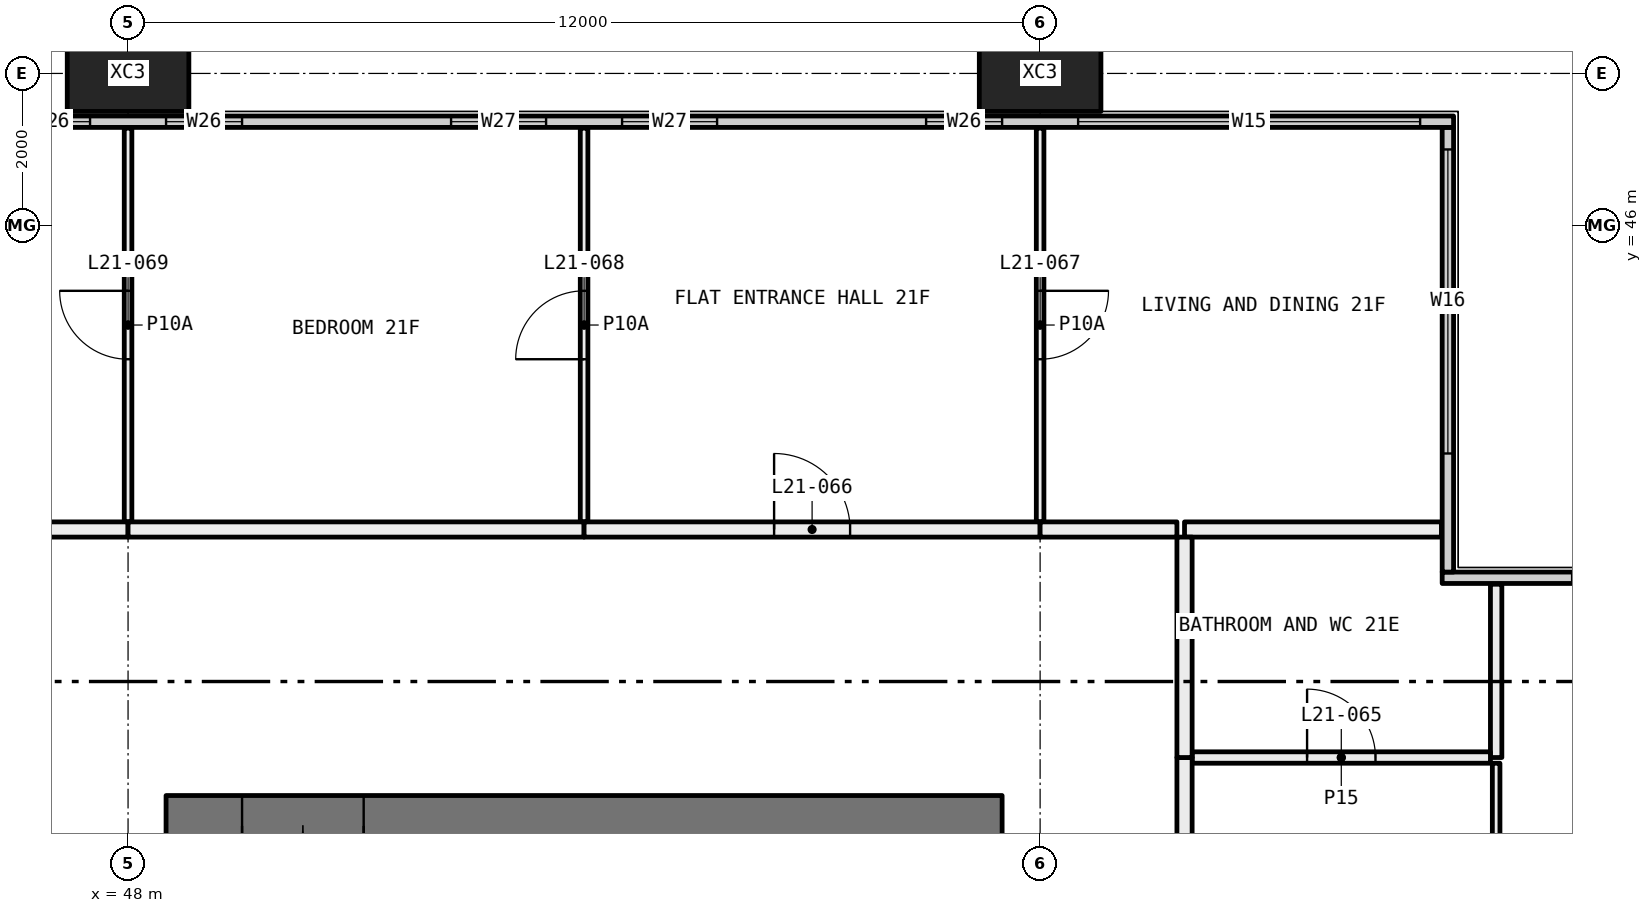
"""IFC4 building model, lengths in metres.
Left out: names, types, materials, properties, quantities, classifications, styles, units other than length and angle.
Written with IfcOpenShell. Run it as: python <this file> out.ifc"""

import sys

from ifc_helpers import new_model, si_unit, direction, frame, frame_2d, origin, origin_2d, place, context, subcontext, project, spatial, rectangle, hollow_rectangle, extrude, element, fill, save


model = new_model("IFC4")
c1 = context("Model", 3, precision=1e-05, world=origin(), true_north=direction((0.0, 1.0)))
c2 = subcontext(c1, "Body", "Model", "MODEL_VIEW")
j1 = project(units=[si_unit("LENGTHUNIT", "METRE"), si_unit("PLANEANGLEUNIT", "RADIAN")], contexts=[c1])
p1 = place(None, origin())
s1 = spatial("IfcSite", under=j1, at=p1, CompositionType="ELEMENT")
p2 = place(p1, origin())
s2 = spatial("IfcBuilding", under=s1, at=p2, CompositionType="ELEMENT")
p3 = place(p2, frame((0.0, 0.0, 85.2)))
s3 = spatial("IfcBuildingStorey", under=s2, at=p3, CompositionType="ELEMENT", Elevation=85.2)
for number, where, z_axis, x_axis in (
    (1, (48.0, 48.0, -0.4), (0.0, 0.0, 1.0), (1.0, 0.0, 0.0)),
    (2, (60.0, 48.0, -0.4), (0.0, 0.0, 1.0), (1.0, 0.0, 0.0)),
):
    element("IfcColumn", number, at=place(p3, frame(where, z_axis=z_axis, x_axis=x_axis)), inside=s3, PredefinedType="COLUMN", context=c2, shape_type="SweptSolid", body=[
        extrude(hollow_rectangle(XDim=1.6, YDim=1.0, WallThickness=0.065, at=origin_2d()), origin(), (0.0, 0.0, 1.0), 3.45),
    ])
p4 = place(p3, frame((65.29, 41.365, 0.0), z_axis=(0.0, 0.0, 1.0), x_axis=(1.0, 0.0, 0.0)))
e3 = element("IfcWall", 3, at=p4, inside=s3, PredefinedType="ELEMENTEDWALL", context=c2, shape_type="SweptSolid", body=[
    extrude(rectangle(XDim=6.15, YDim=0.15, at=frame_2d((3.075, 0.0))), origin(), (0.0, 0.0, 1.0), 3.05),
])
p5 = place(p4, frame((1.71, 0.0, 0.45)))
e4 = element("IfcOpeningElement", 4, at=p5, cuts=e3, PredefinedType="OPENING", context=c2, shape_type="SweptSolid", body=[
    extrude(rectangle(XDim=4.0, YDim=2.55, at=frame_2d((2.0, 1.275))), frame((0.0, 0.085, 0.0), z_axis=(0.0, -1.0, 0.0), x_axis=(1.0, 0.0, 0.0)), (0.0, 0.0, 1.0), 0.17),
])
p6 = place(p3, frame((65.365, 41.44, 0.0), z_axis=(0.0, 0.0, 1.0), x_axis=(0.0, 1.0, 0.0)))
e5 = element("IfcWall", 5, at=p6, inside=s3, PredefinedType="ELEMENTEDWALL", context=c2, shape_type="SweptSolid", body=[
    extrude(rectangle(XDim=5.85, YDim=0.15, at=frame_2d((2.925, 0.0))), origin(), (0.0, 0.0, 1.0), 3.05),
])
p7 = place(p6, frame((1.56, 0.0, 0.45)))
e6 = element("IfcOpeningElement", 6, at=p7, cuts=e5, PredefinedType="OPENING", context=c2, shape_type="SweptSolid", body=[
    extrude(rectangle(XDim=4.0, YDim=2.55, at=frame_2d((2.0, 1.275))), frame((0.0, 0.085, 0.0), z_axis=(0.0, -1.0, 0.0), x_axis=(1.0, 0.0, 0.0)), (0.0, 0.0, 1.0), 0.17),
])
p8 = place(p3, frame((6.56, 47.365, 0.0), z_axis=(0.0, 0.0, 1.0), x_axis=(1.0, 0.0, 0.0)))
e7 = element("IfcWall", 7, at=p8, inside=s3, PredefinedType="ELEMENTEDWALL", context=c2, shape_type="SweptSolid", body=[
    extrude(rectangle(XDim=58.88, YDim=0.15, at=frame_2d((29.44, 0.0))), origin(), (0.0, 0.0, 1.0), 3.05),
])
p9 = place(p8, frame((0.44, 0.0, 0.45)))
e8 = element("IfcOpeningElement", 8, at=p9, cuts=e7, PredefinedType="OPENING", context=c2, shape_type="SweptSolid", body=[
    extrude(rectangle(XDim=4.5, YDim=2.55, at=frame_2d((2.25, 1.275))), frame((0.0, 0.085, 0.0), z_axis=(0.0, -1.0, 0.0), x_axis=(1.0, 0.0, 0.0)), (0.0, 0.0, 1.0), 0.17),
])
p10 = place(p8, frame((5.94, 0.0, 0.45)))
e9 = element("IfcOpeningElement", 9, at=p10, cuts=e7, PredefinedType="OPENING", context=c2, shape_type="SweptSolid", body=[
    extrude(rectangle(XDim=1.0, YDim=2.55, at=frame_2d((0.5, 1.275))), frame((0.0, 0.085, 0.0), z_axis=(0.0, -1.0, 0.0), x_axis=(1.0, 0.0, 0.0)), (0.0, 0.0, 1.0), 0.17),
])
p11 = place(p8, frame((9.69, 0.0, 0.45)))
e10 = element("IfcOpeningElement", 10, at=p11, cuts=e7, PredefinedType="OPENING", context=c2, shape_type="SweptSolid", body=[
    extrude(rectangle(XDim=1.25, YDim=2.55, at=frame_2d((0.625, 1.275))), frame((0.0, 0.085, 0.0), z_axis=(0.0, -1.0, 0.0), x_axis=(1.0, 0.0, 0.0)), (0.0, 0.0, 1.0), 0.17),
])
p12 = place(p8, frame((11.94, 0.0, 0.45)))
e11 = element("IfcOpeningElement", 11, at=p12, cuts=e7, PredefinedType="OPENING", context=c2, shape_type="SweptSolid", body=[
    extrude(rectangle(XDim=1.25, YDim=2.55, at=frame_2d((0.625, 1.275))), frame((0.0, 0.085, 0.0), z_axis=(0.0, -1.0, 0.0), x_axis=(1.0, 0.0, 0.0)), (0.0, 0.0, 1.0), 0.17),
])
p13 = place(p8, frame((15.94, 0.0, 0.45)))
e12 = element("IfcOpeningElement", 12, at=p13, cuts=e7, PredefinedType="OPENING", context=c2, shape_type="SweptSolid", body=[
    extrude(rectangle(XDim=1.0, YDim=2.55, at=frame_2d((0.5, 1.275))), frame((0.0, 0.085, 0.0), z_axis=(0.0, -1.0, 0.0), x_axis=(1.0, 0.0, 0.0)), (0.0, 0.0, 1.0), 0.17),
])
p14 = place(p8, frame((17.94, 0.0, 0.45)))
e13 = element("IfcOpeningElement", 13, at=p14, cuts=e7, PredefinedType="OPENING", context=c2, shape_type="SweptSolid", body=[
    extrude(rectangle(XDim=1.0, YDim=2.55, at=frame_2d((0.5, 1.275))), frame((0.0, 0.085, 0.0), z_axis=(0.0, -1.0, 0.0), x_axis=(1.0, 0.0, 0.0)), (0.0, 0.0, 1.0), 0.17),
])
p15 = place(p8, frame((21.69, 0.0, 0.45)))
e14 = element("IfcOpeningElement", 14, at=p15, cuts=e7, PredefinedType="OPENING", context=c2, shape_type="SweptSolid", body=[
    extrude(rectangle(XDim=1.25, YDim=2.55, at=frame_2d((0.625, 1.275))), frame((0.0, 0.085, 0.0), z_axis=(0.0, -1.0, 0.0), x_axis=(1.0, 0.0, 0.0)), (0.0, 0.0, 1.0), 0.17),
])
p16 = place(p8, frame((23.94, 0.0, 0.45)))
e15 = element("IfcOpeningElement", 15, at=p16, cuts=e7, PredefinedType="OPENING", context=c2, shape_type="SweptSolid", body=[
    extrude(rectangle(XDim=1.25, YDim=2.55, at=frame_2d((0.625, 1.275))), frame((0.0, 0.085, 0.0), z_axis=(0.0, -1.0, 0.0), x_axis=(1.0, 0.0, 0.0)), (0.0, 0.0, 1.0), 0.17),
])
p17 = place(p8, frame((27.94, 0.0, 0.45)))
e16 = element("IfcOpeningElement", 16, at=p17, cuts=e7, PredefinedType="OPENING", context=c2, shape_type="SweptSolid", body=[
    extrude(rectangle(XDim=1.0, YDim=2.55, at=frame_2d((0.5, 1.275))), frame((0.0, 0.085, 0.0), z_axis=(0.0, -1.0, 0.0), x_axis=(1.0, 0.0, 0.0)), (0.0, 0.0, 1.0), 0.17),
])
p18 = place(p8, frame((29.94, 0.0, 0.45)))
e17 = element("IfcOpeningElement", 17, at=p18, cuts=e7, PredefinedType="OPENING", context=c2, shape_type="SweptSolid", body=[
    extrude(rectangle(XDim=1.0, YDim=2.55, at=frame_2d((0.5, 1.275))), frame((0.0, 0.085, 0.0), z_axis=(0.0, -1.0, 0.0), x_axis=(1.0, 0.0, 0.0)), (0.0, 0.0, 1.0), 0.17),
])
p19 = place(p8, frame((33.69, 0.0, 0.45)))
e18 = element("IfcOpeningElement", 18, at=p19, cuts=e7, PredefinedType="OPENING", context=c2, shape_type="SweptSolid", body=[
    extrude(rectangle(XDim=1.25, YDim=2.55, at=frame_2d((0.625, 1.275))), frame((0.0, 0.085, 0.0), z_axis=(0.0, -1.0, 0.0), x_axis=(1.0, 0.0, 0.0)), (0.0, 0.0, 1.0), 0.17),
])
p20 = place(p8, frame((35.94, 0.0, 0.45)))
e19 = element("IfcOpeningElement", 19, at=p20, cuts=e7, PredefinedType="OPENING", context=c2, shape_type="SweptSolid", body=[
    extrude(rectangle(XDim=1.25, YDim=2.55, at=frame_2d((0.625, 1.275))), frame((0.0, 0.085, 0.0), z_axis=(0.0, -1.0, 0.0), x_axis=(1.0, 0.0, 0.0)), (0.0, 0.0, 1.0), 0.17),
])
p21 = place(p8, frame((39.94, 0.0, 0.45)))
e20 = element("IfcOpeningElement", 20, at=p21, cuts=e7, PredefinedType="OPENING", context=c2, shape_type="SweptSolid", body=[
    extrude(rectangle(XDim=1.0, YDim=2.55, at=frame_2d((0.5, 1.275))), frame((0.0, 0.085, 0.0), z_axis=(0.0, -1.0, 0.0), x_axis=(1.0, 0.0, 0.0)), (0.0, 0.0, 1.0), 0.17),
])
p22 = place(p8, frame((41.94, 0.0, 0.45)))
e21 = element("IfcOpeningElement", 21, at=p22, cuts=e7, PredefinedType="OPENING", context=c2, shape_type="SweptSolid", body=[
    extrude(rectangle(XDim=1.0, YDim=2.55, at=frame_2d((0.5, 1.275))), frame((0.0, 0.085, 0.0), z_axis=(0.0, -1.0, 0.0), x_axis=(1.0, 0.0, 0.0)), (0.0, 0.0, 1.0), 0.17),
])
p23 = place(p8, frame((45.69, 0.0, 0.45)))
e22 = element("IfcOpeningElement", 22, at=p23, cuts=e7, PredefinedType="OPENING", context=c2, shape_type="SweptSolid", body=[
    extrude(rectangle(XDim=1.25, YDim=2.55, at=frame_2d((0.625, 1.275))), frame((0.0, 0.085, 0.0), z_axis=(0.0, -1.0, 0.0), x_axis=(1.0, 0.0, 0.0)), (0.0, 0.0, 1.0), 0.17),
])
p24 = place(p8, frame((47.94, 0.0, 0.45)))
e23 = element("IfcOpeningElement", 23, at=p24, cuts=e7, PredefinedType="OPENING", context=c2, shape_type="SweptSolid", body=[
    extrude(rectangle(XDim=1.25, YDim=2.55, at=frame_2d((0.625, 1.275))), frame((0.0, 0.085, 0.0), z_axis=(0.0, -1.0, 0.0), x_axis=(1.0, 0.0, 0.0)), (0.0, 0.0, 1.0), 0.17),
])
p25 = place(p8, frame((51.94, 0.0, 0.45)))
e24 = element("IfcOpeningElement", 24, at=p25, cuts=e7, PredefinedType="OPENING", context=c2, shape_type="SweptSolid", body=[
    extrude(rectangle(XDim=1.0, YDim=2.55, at=frame_2d((0.5, 1.275))), frame((0.0, 0.085, 0.0), z_axis=(0.0, -1.0, 0.0), x_axis=(1.0, 0.0, 0.0)), (0.0, 0.0, 1.0), 0.17),
])
p26 = place(p8, frame((53.94, 0.0, 0.45)))
e25 = element("IfcOpeningElement", 25, at=p26, cuts=e7, PredefinedType="OPENING", context=c2, shape_type="SweptSolid", body=[
    extrude(rectangle(XDim=4.5, YDim=2.55, at=frame_2d((2.25, 1.275))), frame((0.0, 0.085, 0.0), z_axis=(0.0, -1.0, 0.0), x_axis=(1.0, 0.0, 0.0)), (0.0, 0.0, 1.0), 0.17),
])
p27 = place(p3, frame((66.0, 38.925, 0.0), z_axis=(0.0, 0.0, 1.0), x_axis=(0.0, -1.0, 0.0)))
e26 = element("IfcWall", 26, at=p27, inside=s3, PredefinedType="PARTITIONING", context=c2, shape_type="SweptSolid", body=[
    extrude(rectangle(XDim=3.025, YDim=0.1, at=frame_2d((1.513, 0.0))), origin(), (0.0, 0.0, 1.0), 2.45),
])
p28 = place(p3, frame((66.0, 41.28, 0.0), z_axis=(0.0, 0.0, 1.0), x_axis=(0.0, -1.0, 0.0)))
e27 = element("IfcWall", 27, at=p28, inside=s3, PredefinedType="PARTITIONING", context=c2, shape_type="SweptSolid", body=[
    extrude(rectangle(XDim=2.28, YDim=0.15, at=frame_2d((1.14, 0.0))), origin(), (0.0, 0.0, 1.0), 3.05),
])
p29 = place(p3, frame((65.925, 39.0, 0.0), z_axis=(0.0, 0.0, 1.0), x_axis=(-1.0, 0.0, 0.0)))
e28 = element("IfcWall", 28, at=p29, inside=s3, PredefinedType="PARTITIONING", context=c2, shape_type="SweptSolid", body=[
    extrude(rectangle(XDim=3.925, YDim=0.15, at=frame_2d((1.962, 0.0))), origin(), (0.0, 0.0, 1.0), 3.05),
])
p30 = place(p29, frame((1.512, 0.0, 0.0)))
e29 = element("IfcOpeningElement", 29, at=p30, cuts=e28, PredefinedType="OPENING", context=c2, shape_type="SweptSolid", body=[
    extrude(rectangle(XDim=0.9, YDim=2.1, at=frame_2d((0.45, 1.05))), frame((0.0, 0.085, 0.0), z_axis=(0.0, -1.0, 0.0), x_axis=(1.0, 0.0, 0.0)), (0.0, 0.0, 1.0), 0.17),
])
p31 = place(p3, frame((61.9, 39.0, 0.0), z_axis=(0.0, 0.0, 1.0), x_axis=(0.0, -1.0, 0.0)))
e30 = element("IfcWall", 30, at=p31, inside=s3, PredefinedType="PARTITIONING", context=c2, shape_type="SweptSolid", body=[
    extrude(rectangle(XDim=3.1, YDim=0.2, at=frame_2d((1.55, 0.0))), origin(), (0.0, 0.0, 1.0), 2.45),
])
p32 = place(p3, frame((65.28, 42.0, 0.0), z_axis=(0.0, 0.0, 1.0), x_axis=(-1.0, 0.0, 0.0)))
e31 = element("IfcWall", 31, at=p32, inside=s3, PredefinedType="PARTITIONING", context=c2, shape_type="SweptSolid", body=[
    extrude(rectangle(XDim=3.38, YDim=0.2, at=frame_2d((1.69, 0.0))), origin(), (0.0, 0.0, 1.0), 3.05),
])
p33 = place(p3, frame((61.9, 41.9, 0.0), z_axis=(0.0, 0.0, 1.0), x_axis=(0.0, -1.0, 0.0)))
e32 = element("IfcWall", 32, at=p33, inside=s3, PredefinedType="PARTITIONING", context=c2, shape_type="SweptSolid", body=[
    extrude(rectangle(XDim=2.9, YDim=0.2, at=frame_2d((1.45, 0.0))), origin(), (0.0, 0.0, 1.0), 3.05),
])
p34 = place(p3, frame((48.0, 42.1, 0.0), z_axis=(0.0, 0.0, 1.0), x_axis=(0.0, 1.0, 0.0)))
e33 = element("IfcWall", 33, at=p34, inside=s3, PredefinedType="PARTITIONING", context=c2, shape_type="SweptSolid", body=[
    extrude(rectangle(XDim=5.18, YDim=0.1, at=frame_2d((2.59, 0.0))), origin(), (0.0, 0.0, 1.0), 3.05),
])
p35 = place(p34, frame((2.14, 0.0, 0.0)))
e34 = element("IfcOpeningElement", 34, at=p35, cuts=e33, PredefinedType="OPENING", context=c2, shape_type="SweptSolid", body=[
    extrude(rectangle(XDim=0.9, YDim=2.1, at=frame_2d((0.45, 1.05))), frame((0.0, 0.06, 0.0), z_axis=(0.0, -1.0, 0.0), x_axis=(1.0, 0.0, 0.0)), (0.0, 0.0, 1.0), 0.12),
])
p36 = place(p3, frame((46.1, 42.0, 0.0), z_axis=(0.0, 0.0, 1.0), x_axis=(1.0, 0.0, 0.0)))
e35 = element("IfcWall", 35, at=p36, inside=s3, PredefinedType="PARTITIONING", context=c2, shape_type="SweptSolid", body=[
    extrude(rectangle(XDim=1.9, YDim=0.2, at=frame_2d((0.95, 0.0))), origin(), (0.0, 0.0, 1.0), 3.05),
])
p37 = place(p3, frame((54.0, 42.1, 0.0), z_axis=(0.0, 0.0, 1.0), x_axis=(0.0, 1.0, 0.0)))
e36 = element("IfcWall", 36, at=p37, inside=s3, PredefinedType="PARTITIONING", context=c2, shape_type="SweptSolid", body=[
    extrude(rectangle(XDim=5.18, YDim=0.1, at=frame_2d((2.59, 0.0))), origin(), (0.0, 0.0, 1.0), 3.05),
])
p38 = place(p37, frame((2.14, 0.0, 0.0)))
e37 = element("IfcOpeningElement", 37, at=p38, cuts=e36, PredefinedType="OPENING", context=c2, shape_type="SweptSolid", body=[
    extrude(rectangle(XDim=0.9, YDim=2.1, at=frame_2d((0.45, 1.05))), frame((0.0, 0.06, 0.0), z_axis=(0.0, -1.0, 0.0), x_axis=(1.0, 0.0, 0.0)), (0.0, 0.0, 1.0), 0.12),
])
p39 = place(p3, frame((48.0, 42.0, 0.0), z_axis=(0.0, 0.0, 1.0), x_axis=(1.0, 0.0, 0.0)))
e38 = element("IfcWall", 38, at=p39, inside=s3, PredefinedType="PARTITIONING", context=c2, shape_type="SweptSolid", body=[
    extrude(rectangle(XDim=6.0, YDim=0.2, at=frame_2d((3.0, 0.0))), origin(), (0.0, 0.0, 1.0), 3.05),
])
p40 = place(p3, frame((60.0, 42.1, 0.0), z_axis=(0.0, 0.0, 1.0), x_axis=(0.0, 1.0, 0.0)))
e39 = element("IfcWall", 39, at=p40, inside=s3, PredefinedType="PARTITIONING", context=c2, shape_type="SweptSolid", body=[
    extrude(rectangle(XDim=5.18, YDim=0.1, at=frame_2d((2.59, 0.0))), origin(), (0.0, 0.0, 1.0), 3.05),
])
p41 = place(p40, frame((2.14, 0.0, 0.0)))
e40 = element("IfcOpeningElement", 40, at=p41, cuts=e39, PredefinedType="OPENING", context=c2, shape_type="SweptSolid", body=[
    extrude(rectangle(XDim=0.9, YDim=2.1, at=frame_2d((0.45, 1.05))), frame((0.0, 0.06, 0.0), z_axis=(0.0, -1.0, 0.0), x_axis=(1.0, 0.0, 0.0)), (0.0, 0.0, 1.0), 0.12),
])
p42 = place(p3, frame((54.0, 42.0, 0.0), z_axis=(0.0, 0.0, 1.0), x_axis=(1.0, 0.0, 0.0)))
e41 = element("IfcWall", 41, at=p42, inside=s3, PredefinedType="PARTITIONING", context=c2, shape_type="SweptSolid", body=[
    extrude(rectangle(XDim=6.0, YDim=0.2, at=frame_2d((3.0, 0.0))), origin(), (0.0, 0.0, 1.0), 3.05),
])
p43 = place(p42, frame((2.5, 0.0, 0.0)))
e42 = element("IfcOpeningElement", 42, at=p43, cuts=e41, PredefinedType="OPENING", context=c2, shape_type="SweptSolid", body=[
    extrude(rectangle(XDim=1.0, YDim=2.1, at=frame_2d((0.5, 1.05))), frame((0.0, 0.11, 0.0), z_axis=(0.0, -1.0, 0.0), x_axis=(1.0, 0.0, 0.0)), (0.0, 0.0, 1.0), 0.22),
])
p44 = place(p3, frame((60.0, 42.0, 0.0), z_axis=(0.0, 0.0, 1.0), x_axis=(1.0, 0.0, 0.0)))
e43 = element("IfcWall", 43, at=p44, inside=s3, PredefinedType="PARTITIONING", context=c2, shape_type="SweptSolid", body=[
    extrude(rectangle(XDim=1.8, YDim=0.2, at=frame_2d((0.9, 0.0))), origin(), (0.0, 0.0, 1.0), 3.05),
])
p45 = place(p3, frame((59.5, 38.1, 0.0), z_axis=(0.0, 0.0, 1.0), x_axis=(-1.0, 0.0, 0.0)))
e44 = element("IfcWall", 44, at=p45, inside=s3, PredefinedType="SHEAR", context=c2, shape_type="SweptSolid", body=[
    extrude(rectangle(XDim=11.0, YDim=0.8, at=frame_2d((5.5, 0.0))), origin(), (0.0, 0.0, 1.0), 3.05),
])
p46 = place(p45, frame((8.4, 0.0, 0.0)))
e45 = element("IfcOpeningElement", 45, at=p46, cuts=e44, PredefinedType="OPENING", context=c2, shape_type="SweptSolid", body=[
    extrude(rectangle(XDim=1.6, YDim=2.1, at=frame_2d((0.8, 1.05))), frame((0.0, 0.41, 0.0), z_axis=(0.0, -1.0, 0.0), x_axis=(1.0, 0.0, 0.0)), (0.0, 0.0, 1.0), 0.82),
])
p47 = place(p7, origin())
e46 = element("IfcWindow", 46, at=p47, inside=s3, PartitioningType="SINGLE_PANEL", PredefinedType="WINDOW", context=c2, shape_type="SweptSolid", body=[
    extrude(rectangle(XDim=4.0, YDim=2.55, at=frame_2d((2.0, 1.275))), frame((0.0, 0.03, 0.0), z_axis=(0.0, -1.0, 0.0), x_axis=(1.0, 0.0, 0.0)), (0.0, 0.0, 1.0), 0.06),
])
fill(e6, e46)
p48 = place(p21, origin())
e47 = element("IfcWindow", 47, at=p48, inside=s3, PartitioningType="SINGLE_PANEL", PredefinedType="WINDOW", context=c2, shape_type="SweptSolid", body=[
    extrude(rectangle(XDim=1.0, YDim=2.55, at=frame_2d((0.5, 1.275))), frame((0.0, 0.03, 0.0), z_axis=(0.0, -1.0, 0.0), x_axis=(1.0, 0.0, 0.0)), (0.0, 0.0, 1.0), 0.06),
])
fill(e20, e47)
p49 = place(p22, origin())
e48 = element("IfcWindow", 48, at=p49, inside=s3, PartitioningType="SINGLE_PANEL", PredefinedType="WINDOW", context=c2, shape_type="SweptSolid", body=[
    extrude(rectangle(XDim=1.0, YDim=2.55, at=frame_2d((0.5, 1.275))), frame((0.0, 0.03, 0.0), z_axis=(0.0, -1.0, 0.0), x_axis=(1.0, 0.0, 0.0)), (0.0, 0.0, 1.0), 0.06),
])
fill(e21, e48)
p50 = place(p23, origin())
e49 = element("IfcWindow", 49, at=p50, inside=s3, PartitioningType="SINGLE_PANEL", PredefinedType="WINDOW", context=c2, shape_type="SweptSolid", body=[
    extrude(rectangle(XDim=1.25, YDim=2.55, at=frame_2d((0.625, 1.275))), frame((0.0, 0.03, 0.0), z_axis=(0.0, -1.0, 0.0), x_axis=(1.0, 0.0, 0.0)), (0.0, 0.0, 1.0), 0.06),
])
fill(e22, e49)
p51 = place(p24, origin())
e50 = element("IfcWindow", 50, at=p51, inside=s3, PartitioningType="SINGLE_PANEL", PredefinedType="WINDOW", context=c2, shape_type="SweptSolid", body=[
    extrude(rectangle(XDim=1.25, YDim=2.55, at=frame_2d((0.625, 1.275))), frame((0.0, 0.03, 0.0), z_axis=(0.0, -1.0, 0.0), x_axis=(1.0, 0.0, 0.0)), (0.0, 0.0, 1.0), 0.06),
])
fill(e23, e50)
p52 = place(p25, origin())
e51 = element("IfcWindow", 51, at=p52, inside=s3, PartitioningType="SINGLE_PANEL", PredefinedType="WINDOW", context=c2, shape_type="SweptSolid", body=[
    extrude(rectangle(XDim=1.0, YDim=2.55, at=frame_2d((0.5, 1.275))), frame((0.0, 0.03, 0.0), z_axis=(0.0, -1.0, 0.0), x_axis=(1.0, 0.0, 0.0)), (0.0, 0.0, 1.0), 0.06),
])
fill(e24, e51)
p53 = place(p26, origin())
e52 = element("IfcWindow", 52, at=p53, inside=s3, PartitioningType="SINGLE_PANEL", PredefinedType="WINDOW", context=c2, shape_type="SweptSolid", body=[
    extrude(rectangle(XDim=4.5, YDim=2.55, at=frame_2d((2.25, 1.275))), frame((0.0, 0.03, 0.0), z_axis=(0.0, -1.0, 0.0), x_axis=(1.0, 0.0, 0.0)), (0.0, 0.0, 1.0), 0.06),
])
fill(e25, e52)
p54 = place(p30, frame((0.9, 0.0, 0.0), x_axis=(-1.0, 0.0, 0.0)))
e53 = element("IfcDoor", 53, at=p54, inside=s3, OperationType="SINGLE_SWING_RIGHT", PredefinedType="DOOR", context=c2, shape_type="SweptSolid", body=[
    extrude(rectangle(XDim=0.9, YDim=2.1, at=frame_2d((0.45, 1.05))), frame((0.0, 0.025, 0.0), z_axis=(0.0, -1.0, 0.0), x_axis=(1.0, 0.0, 0.0)), (0.0, 0.0, 1.0), 0.05),
])
fill(e29, e53)
p55 = place(p43, origin())
e54 = element("IfcDoor", 54, at=p55, inside=s3, OperationType="SINGLE_SWING_RIGHT", PredefinedType="DOOR", context=c2, shape_type="SweptSolid", body=[
    extrude(rectangle(XDim=1.0, YDim=2.1, at=frame_2d((0.5, 1.05))), frame((0.0, 0.025, 0.0), z_axis=(0.0, -1.0, 0.0), x_axis=(1.0, 0.0, 0.0)), (0.0, 0.0, 1.0), 0.05),
])
fill(e42, e54)
p56 = place(p41, frame((0.9, 0.0, 0.0), x_axis=(-1.0, 0.0, 0.0)))
e55 = element("IfcDoor", 55, at=p56, inside=s3, OperationType="SINGLE_SWING_RIGHT", PredefinedType="DOOR", context=c2, shape_type="SweptSolid", body=[
    extrude(rectangle(XDim=0.9, YDim=2.1, at=frame_2d((0.45, 1.05))), frame((0.0, 0.025, 0.0), z_axis=(0.0, -1.0, 0.0), x_axis=(1.0, 0.0, 0.0)), (0.0, 0.0, 1.0), 0.05),
])
fill(e40, e55)
p57 = place(p38, origin())
e56 = element("IfcDoor", 56, at=p57, inside=s3, OperationType="SINGLE_SWING_RIGHT", PredefinedType="DOOR", context=c2, shape_type="SweptSolid", body=[
    extrude(rectangle(XDim=0.9, YDim=2.1, at=frame_2d((0.45, 1.05))), frame((0.0, 0.025, 0.0), z_axis=(0.0, -1.0, 0.0), x_axis=(1.0, 0.0, 0.0)), (0.0, 0.0, 1.0), 0.05),
])
fill(e37, e56)
p58 = place(p35, origin())
e57 = element("IfcDoor", 57, at=p58, inside=s3, OperationType="SINGLE_SWING_LEFT", PredefinedType="DOOR", context=c2, shape_type="SweptSolid", body=[
    extrude(rectangle(XDim=0.9, YDim=2.1, at=frame_2d((0.45, 1.05))), frame((0.0, 0.025, 0.0), z_axis=(0.0, -1.0, 0.0), x_axis=(1.0, 0.0, 0.0)), (0.0, 0.0, 1.0), 0.05),
])
fill(e34, e57)
p59 = place(p46, origin())
e58 = element("IfcDoor", 58, at=p59, inside=s3, OperationType="DOUBLE_DOOR_SINGLE_SWING", PredefinedType="DOOR", context=c2, shape_type="SweptSolid", body=[
    extrude(rectangle(XDim=1.6, YDim=2.1, at=frame_2d((0.8, 1.05))), frame((0.0, 0.025, 0.0), z_axis=(0.0, -1.0, 0.0), x_axis=(1.0, 0.0, 0.0)), (0.0, 0.0, 1.0), 0.05),
])
fill(e45, e58)
save(model, sys.argv[1])
